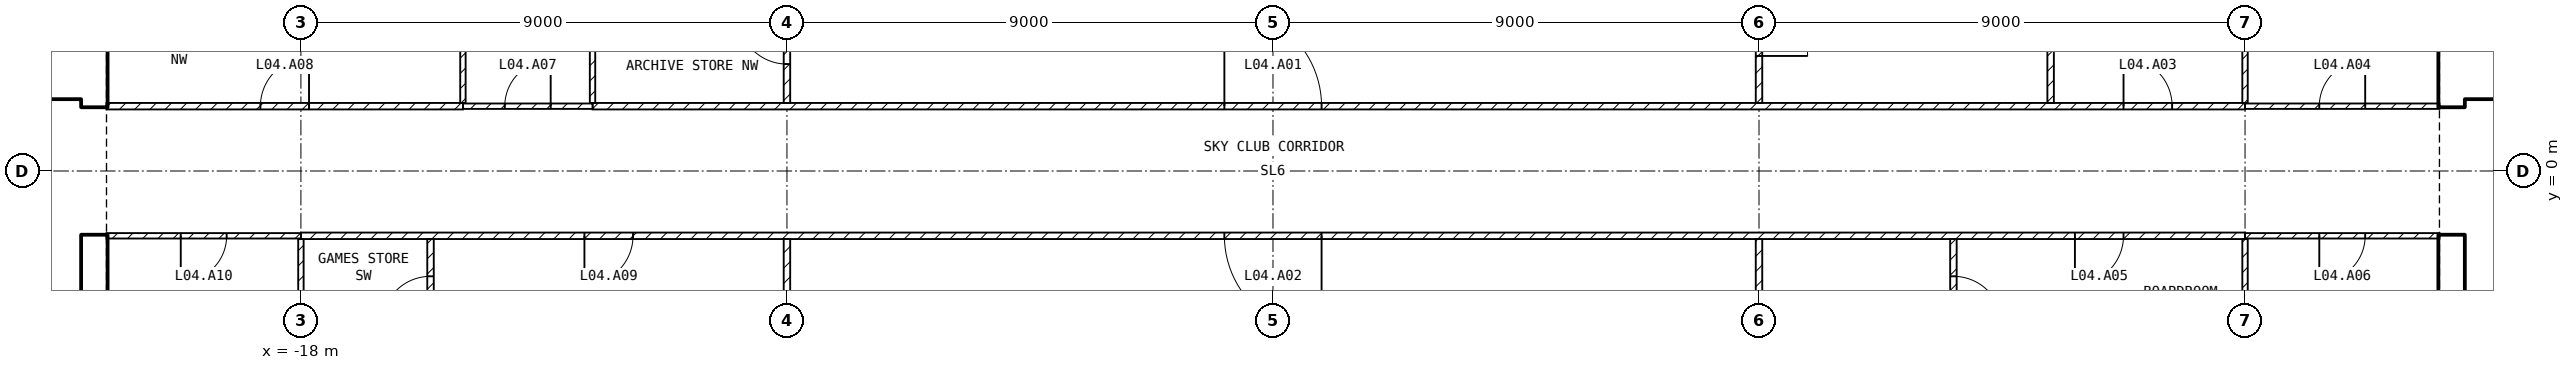
"""IFC4 building model, lengths in metres.
Left out: names, types, materials, properties, quantities, classifications, styles, units other than length and angle.
Written with IfcOpenShell. Run it as: python <this file> out.ifc"""

import sys

from ifc_helpers import new_model, si_unit, direction, frame, frame_2d, origin, place, context, subcontext, project, spatial, rectangle, extrude, element, fill, save


model = new_model("IFC4")
c1 = context("Model", 3, precision=1e-05, world=origin(), true_north=direction((0.0, 1.0)))
c2 = subcontext(c1, "Body", "Model", "MODEL_VIEW")
j1 = project(units=[si_unit("LENGTHUNIT", "METRE"), si_unit("PLANEANGLEUNIT", "RADIAN")], contexts=[c1])
p1 = place(None, origin())
s1 = spatial("IfcSite", under=j1, at=p1, CompositionType="ELEMENT")
p2 = place(p1, origin())
s2 = spatial("IfcBuilding", under=s1, at=p2, CompositionType="ELEMENT")
p3 = place(p2, frame((0.0, 0.0, 32.0)))
s3 = spatial("IfcBuildingStorey", under=s2, at=p3, CompositionType="ELEMENT", Elevation=32.0)
for number, where, z_axis, x_axis in (
    (1, (21.825, -8.1, 0.0), (0.0, 0.0, 1.0), (0.0, 1.0, 0.0)),
    (2, (21.825, 1.2, 0.0), (0.0, 0.0, 1.0), (0.0, 1.0, 0.0)),
):
    element("IfcWall", number, at=place(p3, frame(where, z_axis=z_axis, x_axis=x_axis)), inside=s3, PredefinedType="SHEAR", context=c2, shape_type="SweptSolid", body=[
        extrude(rectangle(XDim=6.9, YDim=0.45, at=frame_2d((3.45, 0.0))), origin(), (0.0, 0.0, 1.0), 4.25),
    ])
p4 = place(p3, frame((22.05, 1.45, 0.0), z_axis=(0.0, 0.0, 1.0), x_axis=(1.0, 0.0, 0.0)))
e3 = element("IfcWall", 3, at=p4, inside=s3, PredefinedType="SOLIDWALL", context=c2, shape_type="SweptSolid", body=[
    extrude(rectangle(XDim=13.05, YDim=0.2, at=frame_2d((6.525, 0.0))), origin(), (0.0, 0.0, 1.0), 4.25),
])
p5 = place(p4, frame((0.75, 0.0, 0.0)))
e4 = element("IfcOpeningElement", 4, at=p5, cuts=e3, PredefinedType="OPENING", context=c2, shape_type="SweptSolid", body=[
    extrude(rectangle(XDim=1.0, YDim=2.1, at=frame_2d((0.5, 1.05))), frame((0.0, 0.11, 0.0), z_axis=(0.0, -1.0, 0.0), x_axis=(1.0, 0.0, 0.0)), (0.0, 0.0, 1.0), 0.22),
])
p6 = place(p4, frame((3.25, 0.0, 0.0)))
e5 = element("IfcOpeningElement", 5, at=p6, cuts=e3, PredefinedType="OPENING", context=c2, shape_type="SweptSolid", body=[
    extrude(rectangle(XDim=1.0, YDim=2.1, at=frame_2d((0.5, 1.05))), frame((0.0, 0.11, 0.0), z_axis=(0.0, -1.0, 0.0), x_axis=(1.0, 0.0, 0.0)), (0.0, 0.0, 1.0), 0.22),
])
for number, where, z_axis, x_axis in (
    (6, (-21.825, -8.1, 0.0), (0.0, 0.0, 1.0), (0.0, 1.0, 0.0)),
    (7, (-21.825, 1.2, 0.0), (0.0, 0.0, 1.0), (0.0, 1.0, 0.0)),
):
    element("IfcWall", number, at=place(p3, frame(where, z_axis=z_axis, x_axis=x_axis)), inside=s3, PredefinedType="SHEAR", context=c2, shape_type="SweptSolid", body=[
        extrude(rectangle(XDim=6.9, YDim=0.45, at=frame_2d((3.45, 0.0))), origin(), (0.0, 0.0, 1.0), 4.25),
    ])
p7 = place(p3, frame((-35.1, 1.45, 0.0), z_axis=(0.0, 0.0, 1.0), x_axis=(1.0, 0.0, 0.0)))
e8 = element("IfcWall", 8, at=p7, inside=s3, PredefinedType="SOLIDWALL", context=c2, shape_type="SweptSolid", body=[
    extrude(rectangle(XDim=13.05, YDim=0.2, at=frame_2d((6.525, 0.0))), origin(), (0.0, 0.0, 1.0), 4.25),
])
p8 = place(p7, frame((11.3, 0.0, 0.0)))
e9 = element("IfcOpeningElement", 9, at=p8, cuts=e8, PredefinedType="OPENING", context=c2, shape_type="SweptSolid", body=[
    extrude(rectangle(XDim=1.0, YDim=2.1, at=frame_2d((0.5, 1.05))), frame((0.0, 0.11, 0.0), z_axis=(0.0, -1.0, 0.0), x_axis=(1.0, 0.0, 0.0)), (0.0, 0.0, 1.0), 0.22),
])
p9 = place(p7, frame((8.8, 0.0, 0.0)))
e10 = element("IfcOpeningElement", 10, at=p9, cuts=e8, PredefinedType="OPENING", context=c2, shape_type="SweptSolid", body=[
    extrude(rectangle(XDim=1.0, YDim=2.1, at=frame_2d((0.5, 1.05))), frame((0.0, 0.11, 0.0), z_axis=(0.0, -1.0, 0.0), x_axis=(1.0, 0.0, 0.0)), (0.0, 0.0, 1.0), 0.22),
])
p10 = place(p3, frame((-12.6, 1.2, 0.0), z_axis=(0.0, 0.0, 1.0), x_axis=(1.0, 0.0, 0.0)))
e11 = element("IfcWall", 11, at=p10, inside=s3, PredefinedType="PARTITIONING", context=c2, shape_type="SweptSolid", body=[
    extrude(rectangle(XDim=30.6, YDim=0.12, at=frame_2d((15.3, 0.0))), origin(), (0.0, 0.0, 1.0), 4.25),
])
p11 = place(p10, frame((11.7, 0.0, 0.0)))
e12 = element("IfcOpeningElement", 12, at=p11, cuts=e11, PredefinedType="OPENING", context=c2, shape_type="SweptSolid", body=[
    extrude(rectangle(XDim=1.8, YDim=2.1, at=frame_2d((0.9, 1.05))), frame((0.0, 0.07, 0.0), z_axis=(0.0, -1.0, 0.0), x_axis=(1.0, 0.0, 0.0)), (0.0, 0.0, 1.0), 0.14),
])
p12 = place(p10, frame((28.35, 0.0, 0.0)))
e13 = element("IfcOpeningElement", 13, at=p12, cuts=e11, PredefinedType="OPENING", context=c2, shape_type="SweptSolid", body=[
    extrude(rectangle(XDim=0.9, YDim=2.1, at=frame_2d((0.45, 1.05))), frame((0.0, 0.07, 0.0), z_axis=(0.0, -1.0, 0.0), x_axis=(1.0, 0.0, 0.0)), (0.0, 0.0, 1.0), 0.14),
])
p13 = place(p3, frame((18.0, -1.2, 0.0), z_axis=(0.0, 0.0, 1.0), x_axis=(-1.0, 0.0, 0.0)))
e14 = element("IfcWall", 14, at=p13, inside=s3, PredefinedType="PARTITIONING", context=c2, shape_type="SweptSolid", body=[
    extrude(rectangle(XDim=36.0, YDim=0.12, at=frame_2d((18.0, 0.0))), origin(), (0.0, 0.0, 1.0), 4.25),
])
p14 = place(p13, frame((17.1, 0.0, 0.0)))
e15 = element("IfcOpeningElement", 15, at=p14, cuts=e14, PredefinedType="OPENING", context=c2, shape_type="SweptSolid", body=[
    extrude(rectangle(XDim=1.8, YDim=2.1, at=frame_2d((0.9, 1.05))), frame((0.0, 0.07, 0.0), z_axis=(0.0, -1.0, 0.0), x_axis=(1.0, 0.0, 0.0)), (0.0, 0.0, 1.0), 0.14),
])
p15 = place(p13, frame((2.25, 0.0, 0.0)))
e16 = element("IfcOpeningElement", 16, at=p15, cuts=e14, PredefinedType="OPENING", context=c2, shape_type="SweptSolid", body=[
    extrude(rectangle(XDim=0.9, YDim=2.1, at=frame_2d((0.45, 1.05))), frame((0.0, 0.07, 0.0), z_axis=(0.0, -1.0, 0.0), x_axis=(1.0, 0.0, 0.0)), (0.0, 0.0, 1.0), 0.14),
])
p16 = place(p13, frame((29.85, 0.0, 0.0)))
e17 = element("IfcOpeningElement", 17, at=p16, cuts=e14, PredefinedType="OPENING", context=c2, shape_type="SweptSolid", body=[
    extrude(rectangle(XDim=0.9, YDim=2.1, at=frame_2d((0.45, 1.05))), frame((0.0, 0.07, 0.0), z_axis=(0.0, -1.0, 0.0), x_axis=(1.0, 0.0, 0.0)), (0.0, 0.0, 1.0), 0.14),
])
p17 = place(p3, frame((18.0, 1.2, 0.0), z_axis=(0.0, 0.0, 1.0), x_axis=(1.0, 0.0, 0.0)))
e18 = element("IfcWall", 18, at=p17, inside=s3, PredefinedType="PARTITIONING", context=c2, shape_type="SweptSolid", body=[
    extrude(rectangle(XDim=3.6, YDim=0.1, at=frame_2d((1.8, 0.0))), origin(), (0.0, 0.0, 1.0), 4.25),
])
p18 = place(p17, frame((1.375, 0.0, 0.0)))
e19 = element("IfcOpeningElement", 19, at=p18, cuts=e18, PredefinedType="OPENING", context=c2, shape_type="SweptSolid", body=[
    extrude(rectangle(XDim=0.85, YDim=2.1, at=frame_2d((0.425, 1.05))), frame((0.0, 0.06, 0.0), z_axis=(0.0, -1.0, 0.0), x_axis=(1.0, 0.0, 0.0)), (0.0, 0.0, 1.0), 0.12),
])
p19 = place(p3, frame((21.6, -1.2, 0.0), z_axis=(0.0, 0.0, 1.0), x_axis=(-1.0, 0.0, 0.0)))
e20 = element("IfcWall", 20, at=p19, inside=s3, PredefinedType="PARTITIONING", context=c2, shape_type="SweptSolid", body=[
    extrude(rectangle(XDim=3.6, YDim=0.1, at=frame_2d((1.8, 0.0))), origin(), (0.0, 0.0, 1.0), 4.25),
])
p20 = place(p19, frame((1.375, 0.0, 0.0)))
e21 = element("IfcOpeningElement", 21, at=p20, cuts=e20, PredefinedType="OPENING", context=c2, shape_type="SweptSolid", body=[
    extrude(rectangle(XDim=0.85, YDim=2.1, at=frame_2d((0.425, 1.05))), frame((0.0, 0.06, 0.0), z_axis=(0.0, -1.0, 0.0), x_axis=(1.0, 0.0, 0.0)), (0.0, 0.0, 1.0), 0.12),
])
p21 = place(p3, frame((-15.0, 1.2, 0.0), z_axis=(0.0, 0.0, 1.0), x_axis=(1.0, 0.0, 0.0)))
e22 = element("IfcWall", 22, at=p21, inside=s3, PredefinedType="PARTITIONING", context=c2, shape_type="SweptSolid", body=[
    extrude(rectangle(XDim=2.4, YDim=0.1, at=frame_2d((1.2, 0.0))), origin(), (0.0, 0.0, 1.0), 4.25),
])
p22 = place(p21, frame((0.775, 0.0, 0.0)))
e23 = element("IfcOpeningElement", 23, at=p22, cuts=e22, PredefinedType="OPENING", context=c2, shape_type="SweptSolid", body=[
    extrude(rectangle(XDim=0.85, YDim=2.1, at=frame_2d((0.425, 1.05))), frame((0.0, 0.06, 0.0), z_axis=(0.0, -1.0, 0.0), x_axis=(1.0, 0.0, 0.0)), (0.0, 0.0, 1.0), 0.12),
])
p23 = place(p3, frame((-21.6, 1.2, 0.0), z_axis=(0.0, 0.0, 1.0), x_axis=(1.0, 0.0, 0.0)))
e24 = element("IfcWall", 24, at=p23, inside=s3, PredefinedType="PARTITIONING", context=c2, shape_type="SweptSolid", body=[
    extrude(rectangle(XDim=6.6, YDim=0.12, at=frame_2d((3.3, 0.0))), origin(), (0.0, 0.0, 1.0), 4.25),
])
p24 = place(p23, frame((2.85, 0.0, 0.0)))
e25 = element("IfcOpeningElement", 25, at=p24, cuts=e24, PredefinedType="OPENING", context=c2, shape_type="SweptSolid", body=[
    extrude(rectangle(XDim=0.9, YDim=2.1, at=frame_2d((0.45, 1.05))), frame((0.0, 0.07, 0.0), z_axis=(0.0, -1.0, 0.0), x_axis=(1.0, 0.0, 0.0)), (0.0, 0.0, 1.0), 0.14),
])
p25 = place(p3, frame((-18.0, -1.2, 0.0), z_axis=(0.0, 0.0, 1.0), x_axis=(-1.0, 0.0, 0.0)))
e26 = element("IfcWall", 26, at=p25, inside=s3, PredefinedType="PARTITIONING", context=c2, shape_type="SweptSolid", body=[
    extrude(rectangle(XDim=3.6, YDim=0.1, at=frame_2d((1.8, 0.0))), origin(), (0.0, 0.0, 1.0), 4.25),
])
p26 = place(p25, frame((1.375, 0.0, 0.0)))
e27 = element("IfcOpeningElement", 27, at=p26, cuts=e26, PredefinedType="OPENING", context=c2, shape_type="SweptSolid", body=[
    extrude(rectangle(XDim=0.85, YDim=2.1, at=frame_2d((0.425, 1.05))), frame((0.0, 0.06, 0.0), z_axis=(0.0, -1.0, 0.0), x_axis=(1.0, 0.0, 0.0)), (0.0, 0.0, 1.0), 0.12),
])
p27 = place(p3, frame((9.0, 8.92, 0.0), z_axis=(0.0, 0.0, 1.0), x_axis=(0.0, -1.0, 0.0)))
e28 = element("IfcWall", 28, at=p27, inside=s3, PredefinedType="PARTITIONING", context=c2, shape_type="SweptSolid", body=[
    extrude(rectangle(XDim=7.66, YDim=0.12, at=frame_2d((3.83, 0.0))), origin(), (0.0, 0.0, 1.0), 4.25),
])
p28 = place(p27, frame((2.77, 0.0, 0.0)))
e29 = element("IfcOpeningElement", 29, at=p28, cuts=e28, PredefinedType="OPENING", context=c2, shape_type="SweptSolid", body=[
    extrude(rectangle(XDim=0.9, YDim=2.1, at=frame_2d((0.45, 1.05))), frame((0.0, 0.07, 0.0), z_axis=(0.0, -1.0, 0.0), x_axis=(1.0, 0.0, 0.0)), (0.0, 0.0, 1.0), 0.14),
])
p29 = place(p27, frame((5.89, 0.0, 0.0)))
e30 = element("IfcOpeningElement", 30, at=p29, cuts=e28, PredefinedType="OPENING", context=c2, shape_type="SweptSolid", body=[
    extrude(rectangle(XDim=0.9, YDim=2.1, at=frame_2d((0.45, 1.05))), frame((0.0, 0.07, 0.0), z_axis=(0.0, -1.0, 0.0), x_axis=(1.0, 0.0, 0.0)), (0.0, 0.0, 1.0), 0.14),
])
p30 = place(p3, frame((-9.0, 1.26, 0.0), z_axis=(0.0, 0.0, 1.0), x_axis=(0.0, 1.0, 0.0)))
e31 = element("IfcWall", 31, at=p30, inside=s3, PredefinedType="PARTITIONING", context=c2, shape_type="SweptSolid", body=[
    extrude(rectangle(XDim=7.66, YDim=0.12, at=frame_2d((3.83, 0.0))), origin(), (0.0, 0.0, 1.0), 4.25),
])
p31 = place(p30, frame((0.72, 0.0, 0.0)))
e32 = element("IfcOpeningElement", 32, at=p31, cuts=e31, PredefinedType="OPENING", context=c2, shape_type="SweptSolid", body=[
    extrude(rectangle(XDim=0.9, YDim=2.1, at=frame_2d((0.45, 1.05))), frame((0.0, 0.07, 0.0), z_axis=(0.0, -1.0, 0.0), x_axis=(1.0, 0.0, 0.0)), (0.0, 0.0, 1.0), 0.14),
])
for number, where, z_axis, x_axis in (
    (33, (9.0, -1.26, 0.0), (0.0, 0.0, 1.0), (0.0, -1.0, 0.0)),
    (34, (-9.0, -8.92, 0.0), (0.0, 0.0, 1.0), (0.0, 1.0, 0.0)),
):
    element("IfcWall", number, at=place(p3, frame(where, z_axis=z_axis, x_axis=x_axis)), inside=s3, PredefinedType="PARTITIONING", context=c2, shape_type="SweptSolid", body=[
        extrude(rectangle(XDim=7.66, YDim=0.12, at=frame_2d((3.83, 0.0))), origin(), (0.0, 0.0, 1.0), 4.25),
    ])
p32 = place(p3, frame((14.4, 3.84, 0.0), z_axis=(0.0, 0.0, 1.0), x_axis=(0.0, -1.0, 0.0)))
e35 = element("IfcWall", 35, at=p32, inside=s3, PredefinedType="PARTITIONING", context=c2, shape_type="SweptSolid", body=[
    extrude(rectangle(XDim=2.58, YDim=0.12, at=frame_2d((1.29, 0.0))), origin(), (0.0, 0.0, 1.0), 4.25),
])
p33 = place(p3, frame((18.0, 3.84, 0.0), z_axis=(0.0, 0.0, 1.0), x_axis=(0.0, -1.0, 0.0)))
e36 = element("IfcWall", 36, at=p33, inside=s3, PredefinedType="PARTITIONING", context=c2, shape_type="SweptSolid", body=[
    extrude(rectangle(XDim=2.58, YDim=0.1, at=frame_2d((1.29, 0.0))), origin(), (0.0, 0.0, 1.0), 3.346),
])
p34 = place(p3, frame((12.6, -1.26, 0.0), z_axis=(0.0, 0.0, 1.0), x_axis=(0.0, -1.0, 0.0)))
e37 = element("IfcWall", 37, at=p34, inside=s3, PredefinedType="PARTITIONING", context=c2, shape_type="SweptSolid", body=[
    extrude(rectangle(XDim=2.28, YDim=0.12, at=frame_2d((1.14, 0.0))), origin(), (0.0, 0.0, 1.0), 4.25),
])
p35 = place(p34, frame((0.69, 0.0, 0.0)))
e38 = element("IfcOpeningElement", 38, at=p35, cuts=e37, PredefinedType="OPENING", context=c2, shape_type="SweptSolid", body=[
    extrude(rectangle(XDim=0.9, YDim=2.1, at=frame_2d((0.45, 1.05))), frame((0.0, 0.07, 0.0), z_axis=(0.0, -1.0, 0.0), x_axis=(1.0, 0.0, 0.0)), (0.0, 0.0, 1.0), 0.14),
])
p36 = place(p3, frame((18.0, -1.26, 0.0), z_axis=(0.0, 0.0, 1.0), x_axis=(0.0, -1.0, 0.0)))
e39 = element("IfcWall", 39, at=p36, inside=s3, PredefinedType="PARTITIONING", context=c2, shape_type="SweptSolid", body=[
    extrude(rectangle(XDim=2.28, YDim=0.1, at=frame_2d((1.14, 0.0))), origin(), (0.0, 0.0, 1.0), 3.346),
])
for number, where, z_axis, x_axis in (
    (40, (-12.6, 1.26, 0.0), (0.0, 0.0, 1.0), (0.0, 1.0, 0.0)),
    (41, (-15.0, 1.26, 0.0), (0.0, 0.0, 1.0), (0.0, 1.0, 0.0)),
):
    element("IfcWall", number, at=place(p3, frame(where, z_axis=z_axis, x_axis=x_axis)), inside=s3, PredefinedType="PARTITIONING", context=c2, shape_type="SweptSolid", body=[
        extrude(rectangle(XDim=2.28, YDim=0.1, at=frame_2d((1.14, 0.0))), origin(), (0.0, 0.0, 1.0), 4.25),
    ])
p37 = place(p3, frame((-15.6, -3.54, 0.0), z_axis=(0.0, 0.0, 1.0), x_axis=(0.0, 1.0, 0.0)))
e42 = element("IfcWall", 42, at=p37, inside=s3, PredefinedType="PARTITIONING", context=c2, shape_type="SweptSolid", body=[
    extrude(rectangle(XDim=2.28, YDim=0.12, at=frame_2d((1.14, 0.0))), origin(), (0.0, 0.0, 1.0), 4.25),
])
p38 = place(p37, frame((0.69, 0.0, 0.0)))
e43 = element("IfcOpeningElement", 43, at=p38, cuts=e42, PredefinedType="OPENING", context=c2, shape_type="SweptSolid", body=[
    extrude(rectangle(XDim=0.9, YDim=2.1, at=frame_2d((0.45, 1.05))), frame((0.0, 0.07, 0.0), z_axis=(0.0, -1.0, 0.0), x_axis=(1.0, 0.0, 0.0)), (0.0, 0.0, 1.0), 0.14),
])
p39 = place(p3, frame((-18.0, -3.6, 0.0), z_axis=(0.0, 0.0, 1.0), x_axis=(0.0, 1.0, 0.0)))
e44 = element("IfcWall", 44, at=p39, inside=s3, PredefinedType="PARTITIONING", context=c2, shape_type="SweptSolid", body=[
    extrude(rectangle(XDim=2.34, YDim=0.1, at=frame_2d((1.17, 0.0))), origin(), (0.0, 0.0, 1.0), 3.346),
])
p40 = place(p11, origin())
e45 = element("IfcDoor", 45, at=p40, inside=s3, OperationType="SINGLE_SWING_LEFT", PredefinedType="DOOR", context=c2, shape_type="SweptSolid", body=[
    extrude(rectangle(XDim=1.8, YDim=2.1, at=frame_2d((0.9, 1.05))), frame((0.0, 0.025, 0.0), z_axis=(0.0, -1.0, 0.0), x_axis=(1.0, 0.0, 0.0)), (0.0, 0.0, 1.0), 0.05),
])
fill(e12, e45)
p41 = place(p14, origin())
e46 = element("IfcDoor", 46, at=p41, inside=s3, OperationType="SINGLE_SWING_LEFT", PredefinedType="DOOR", context=c2, shape_type="SweptSolid", body=[
    extrude(rectangle(XDim=1.8, YDim=2.1, at=frame_2d((0.9, 1.05))), frame((0.0, 0.025, 0.0), z_axis=(0.0, -1.0, 0.0), x_axis=(1.0, 0.0, 0.0)), (0.0, 0.0, 1.0), 0.05),
])
fill(e15, e46)
p42 = place(p12, origin())
e47 = element("IfcDoor", 47, at=p42, inside=s3, OperationType="SINGLE_SWING_LEFT", PredefinedType="DOOR", context=c2, shape_type="SweptSolid", body=[
    extrude(rectangle(XDim=0.9, YDim=2.1, at=frame_2d((0.45, 1.05))), frame((0.0, 0.025, 0.0), z_axis=(0.0, -1.0, 0.0), x_axis=(1.0, 0.0, 0.0)), (0.0, 0.0, 1.0), 0.05),
])
fill(e13, e47)
p43 = place(p18, origin())
e48 = element("IfcDoor", 48, at=p43, inside=s3, OperationType="SINGLE_SWING_RIGHT", PredefinedType="DOOR", context=c2, shape_type="SweptSolid", body=[
    extrude(rectangle(XDim=0.85, YDim=2.1, at=frame_2d((0.425, 1.05))), frame((0.0, 0.025, 0.0), z_axis=(0.0, -1.0, 0.0), x_axis=(1.0, 0.0, 0.0)), (0.0, 0.0, 1.0), 0.05),
])
fill(e19, e48)
p44 = place(p15, origin())
e49 = element("IfcDoor", 49, at=p44, inside=s3, OperationType="SINGLE_SWING_RIGHT", PredefinedType="DOOR", context=c2, shape_type="SweptSolid", body=[
    extrude(rectangle(XDim=0.9, YDim=2.1, at=frame_2d((0.45, 1.05))), frame((0.0, 0.025, 0.0), z_axis=(0.0, -1.0, 0.0), x_axis=(1.0, 0.0, 0.0)), (0.0, 0.0, 1.0), 0.05),
])
fill(e16, e49)
p45 = place(p20, origin())
e50 = element("IfcDoor", 50, at=p45, inside=s3, OperationType="SINGLE_SWING_RIGHT", PredefinedType="DOOR", context=c2, shape_type="SweptSolid", body=[
    extrude(rectangle(XDim=0.85, YDim=2.1, at=frame_2d((0.425, 1.05))), frame((0.0, 0.025, 0.0), z_axis=(0.0, -1.0, 0.0), x_axis=(1.0, 0.0, 0.0)), (0.0, 0.0, 1.0), 0.05),
])
fill(e21, e50)
p46 = place(p22, origin())
e51 = element("IfcDoor", 51, at=p46, inside=s3, OperationType="SINGLE_SWING_RIGHT", PredefinedType="DOOR", context=c2, shape_type="SweptSolid", body=[
    extrude(rectangle(XDim=0.85, YDim=2.1, at=frame_2d((0.425, 1.05))), frame((0.0, 0.025, 0.0), z_axis=(0.0, -1.0, 0.0), x_axis=(1.0, 0.0, 0.0)), (0.0, 0.0, 1.0), 0.05),
])
fill(e23, e51)
p47 = place(p24, origin())
e52 = element("IfcDoor", 52, at=p47, inside=s3, OperationType="SINGLE_SWING_RIGHT", PredefinedType="DOOR", context=c2, shape_type="SweptSolid", body=[
    extrude(rectangle(XDim=0.9, YDim=2.1, at=frame_2d((0.45, 1.05))), frame((0.0, 0.025, 0.0), z_axis=(0.0, -1.0, 0.0), x_axis=(1.0, 0.0, 0.0)), (0.0, 0.0, 1.0), 0.05),
])
fill(e25, e52)
p48 = place(p16, origin())
e53 = element("IfcDoor", 53, at=p48, inside=s3, OperationType="SINGLE_SWING_RIGHT", PredefinedType="DOOR", context=c2, shape_type="SweptSolid", body=[
    extrude(rectangle(XDim=0.9, YDim=2.1, at=frame_2d((0.45, 1.05))), frame((0.0, 0.025, 0.0), z_axis=(0.0, -1.0, 0.0), x_axis=(1.0, 0.0, 0.0)), (0.0, 0.0, 1.0), 0.05),
])
fill(e17, e53)
p49 = place(p26, origin())
e54 = element("IfcDoor", 54, at=p49, inside=s3, OperationType="SINGLE_SWING_RIGHT", PredefinedType="DOOR", context=c2, shape_type="SweptSolid", body=[
    extrude(rectangle(XDim=0.85, YDim=2.1, at=frame_2d((0.425, 1.05))), frame((0.0, 0.025, 0.0), z_axis=(0.0, -1.0, 0.0), x_axis=(1.0, 0.0, 0.0)), (0.0, 0.0, 1.0), 0.05),
])
fill(e27, e54)
p50 = place(p31, origin())
e55 = element("IfcDoor", 55, at=p50, inside=s3, OperationType="SINGLE_SWING_RIGHT", PredefinedType="DOOR", context=c2, shape_type="SweptSolid", body=[
    extrude(rectangle(XDim=0.9, YDim=2.1, at=frame_2d((0.45, 1.05))), frame((0.0, 0.025, 0.0), z_axis=(0.0, -1.0, 0.0), x_axis=(1.0, 0.0, 0.0)), (0.0, 0.0, 1.0), 0.05),
])
fill(e32, e55)
p51 = place(p38, origin())
e56 = element("IfcDoor", 56, at=p51, inside=s3, OperationType="SINGLE_SWING_LEFT", PredefinedType="DOOR", context=c2, shape_type="SweptSolid", body=[
    extrude(rectangle(XDim=0.9, YDim=2.1, at=frame_2d((0.45, 1.05))), frame((0.0, 0.025, 0.0), z_axis=(0.0, -1.0, 0.0), x_axis=(1.0, 0.0, 0.0)), (0.0, 0.0, 1.0), 0.05),
])
fill(e43, e56)
p52 = place(p29, origin())
e57 = element("IfcDoor", 57, at=p52, inside=s3, OperationType="SINGLE_SWING_RIGHT", PredefinedType="DOOR", context=c2, shape_type="SweptSolid", body=[
    extrude(rectangle(XDim=0.9, YDim=2.1, at=frame_2d((0.45, 1.05))), frame((0.0, 0.025, 0.0), z_axis=(0.0, -1.0, 0.0), x_axis=(1.0, 0.0, 0.0)), (0.0, 0.0, 1.0), 0.05),
])
fill(e30, e57)
p53 = place(p35, origin())
e58 = element("IfcDoor", 58, at=p53, inside=s3, OperationType="SINGLE_SWING_RIGHT", PredefinedType="DOOR", context=c2, shape_type="SweptSolid", body=[
    extrude(rectangle(XDim=0.9, YDim=2.1, at=frame_2d((0.45, 1.05))), frame((0.0, 0.025, 0.0), z_axis=(0.0, -1.0, 0.0), x_axis=(1.0, 0.0, 0.0)), (0.0, 0.0, 1.0), 0.05),
])
fill(e38, e58)
save(model, sys.argv[1])
